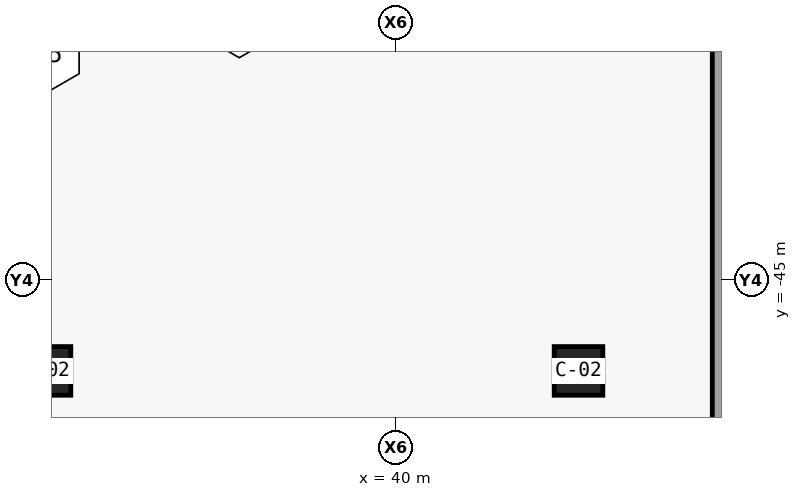
"""IFC4 building model, lengths in metres.
Left out: names, types, materials, properties, quantities, classifications, styles, units other than length and angle.
Written with IfcOpenShell. Run it as: python <this file> out.ifc"""

import sys

from ifc_helpers import new_model, si_unit, direction, frame, origin, origin_2d, place, context, subcontext, project, spatial, polyline, rectangle, outline, extrude, element, save


model = new_model("IFC4")
c1 = context("Model", 3, precision=1e-05, world=origin(), true_north=direction((0.0, 1.0)))
c2 = subcontext(c1, "Body", "Model", "MODEL_VIEW")
j1 = project(units=[si_unit("LENGTHUNIT", "METRE"), si_unit("PLANEANGLEUNIT", "RADIAN")], contexts=[c1])
p1 = place(None, origin())
s1 = spatial("IfcSite", under=j1, at=p1, CompositionType="ELEMENT")
p2 = place(p1, origin())
s2 = spatial("IfcBuilding", under=s1, at=p2, CompositionType="ELEMENT")
p3 = place(p2, frame((0.0, 0.0, -4.5)))
s3 = spatial("IfcBuildingStorey", under=s2, at=p3, CompositionType="ELEMENT", Elevation=-4.5)
p4 = place(p3, frame((50.7, -83.0, 0.0), z_axis=(0.0, 0.0, 1.0), x_axis=(0.0, 1.0, 0.0)))
e1 = element("IfcWall", 1, at=p4, inside=s3, PredefinedType="SOLIDWALL", context=c2, shape_type="SweptSolid", body=[
    extrude(outline(polyline([(0.6, -0.3), (0.6, 0.3), (81.4, 0.3), (82.0, 0.3), (82.0, -0.3), (0.6, -0.3)])), origin(), (0.0, 0.0, 1.0), 4.5),
])
for number, where, z_axis, x_axis in (
    (2, (28.5, -48.0, 0.0), (0.0, 0.0, 1.0), (1.0, 0.0, 0.0)),
    (3, (46.0, -48.0, 0.0), (0.0, 0.0, 1.0), (1.0, 0.0, 0.0)),
):
    element("IfcColumn", number, at=place(p3, frame(where, z_axis=z_axis, x_axis=x_axis)), inside=s3, PredefinedType="COLUMN", context=c2, shape_type="SweptSolid", body=[
        extrude(rectangle(XDim=1.6, YDim=1.6, at=origin_2d()), origin(), (0.0, 0.0, 1.0), 4.5),
    ])
save(model, sys.argv[1])
